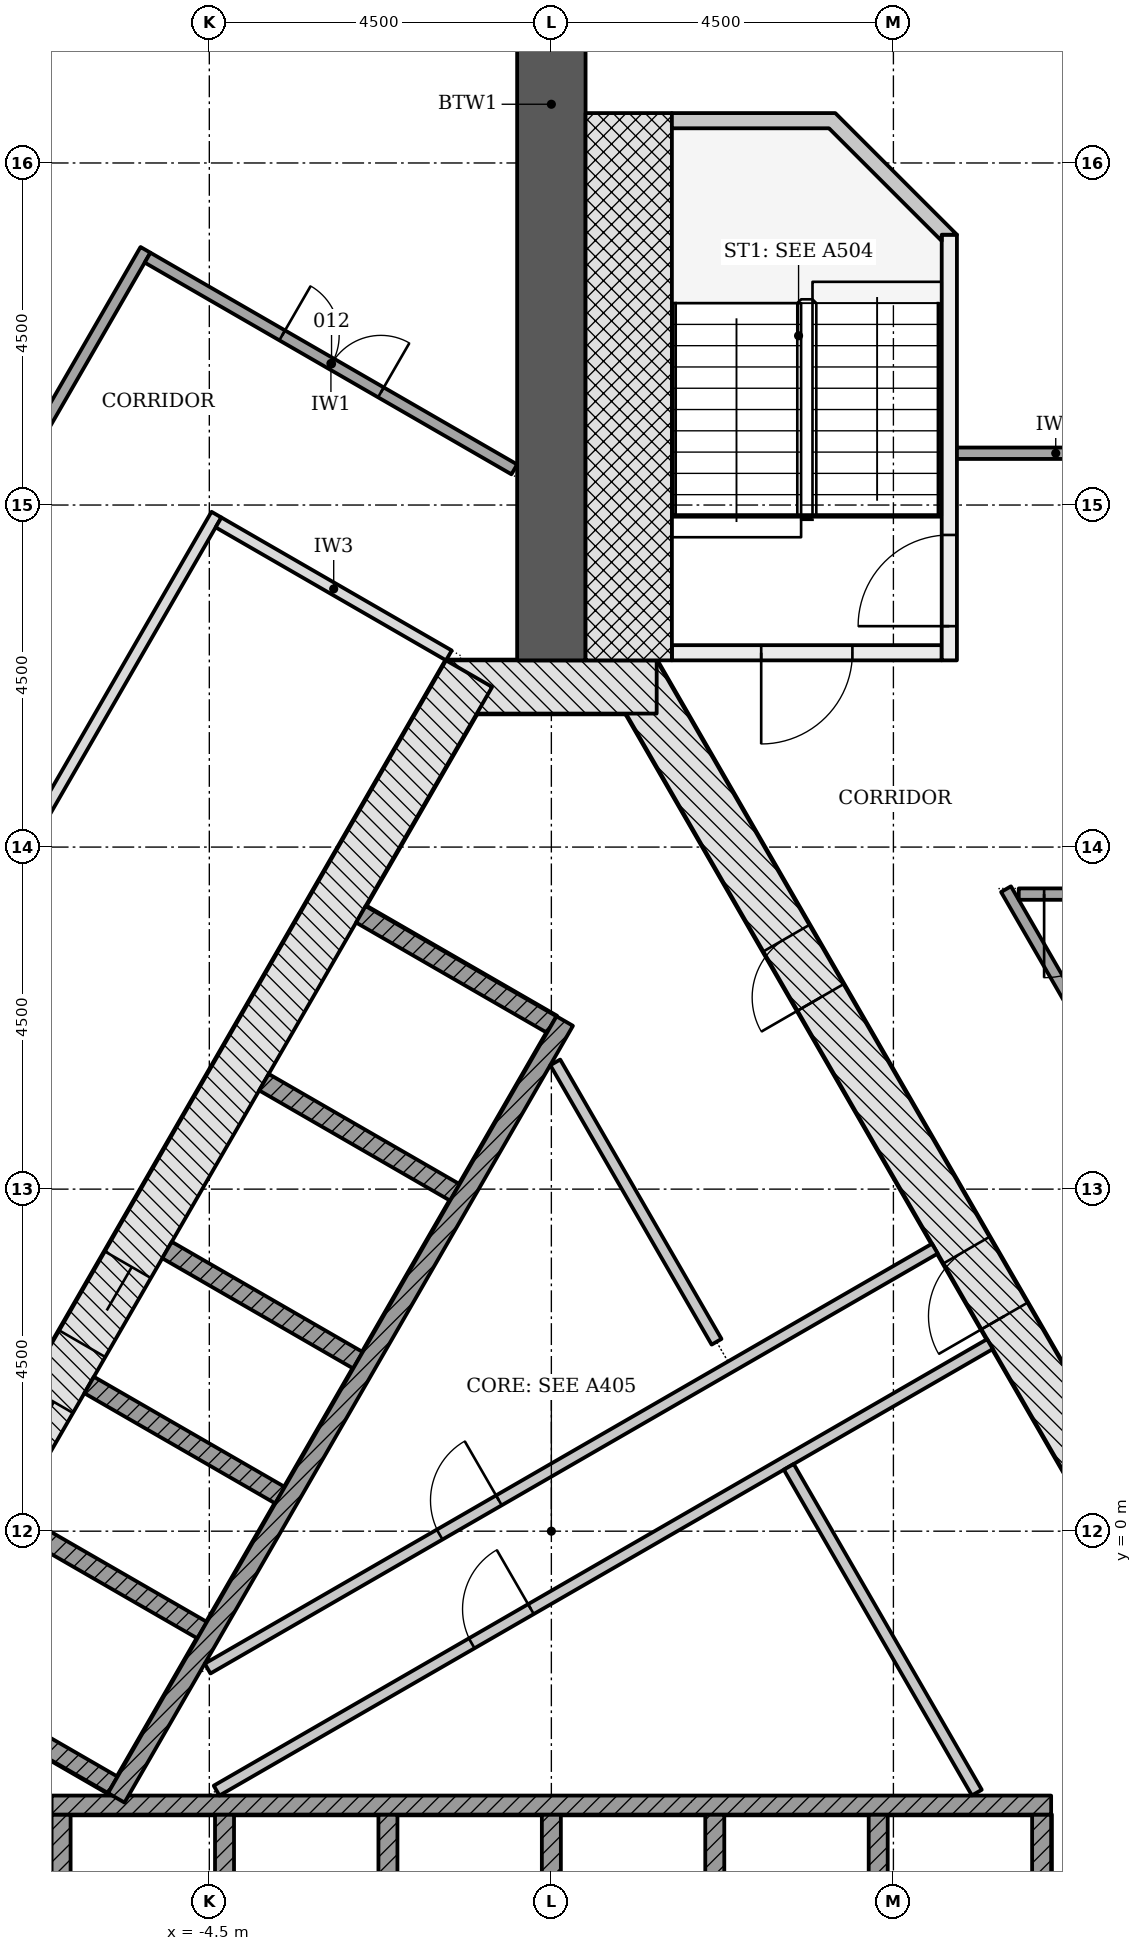
"""IFC4 building model, lengths in metres.
Left out: names, types, materials, properties, quantities, classifications, styles, units other than length and angle.
Written with IfcOpenShell. Run it as: python <this file> out.ifc"""

import sys

from ifc_helpers import new_model, si_unit, direction, frame, frame_2d, origin, place, context, subcontext, project, spatial, polyline, rectangle, outline, extrude, element, fill, save


model = new_model("IFC4")
c1 = context("Model", 3, precision=1e-05, world=origin(), true_north=direction((0.0, 1.0)))
c2 = subcontext(c1, "Body", "Model", "MODEL_VIEW")
j1 = project(units=[si_unit("LENGTHUNIT", "METRE"), si_unit("PLANEANGLEUNIT", "RADIAN")], contexts=[c1])
p1 = place(None, origin())
s1 = spatial("IfcSite", under=j1, at=p1, CompositionType="ELEMENT")
p2 = place(p1, origin())
s2 = spatial("IfcBuilding", under=s1, at=p2, CompositionType="ELEMENT")
p3 = place(p2, frame((0.0, 0.0, 24.0)))
s3 = spatial("IfcBuildingStorey", under=s2, at=p3, CompositionType="ELEMENT", Elevation=24.0)
p4 = place(p3, frame((10.311, -4.703, -0.2), z_axis=(0.0, 0.0, 1.0), x_axis=(-0.500001446645, 0.866024568562, 0.0)))
e1 = element("IfcWall", 1, at=p4, inside=s3, PredefinedType="SHEAR", context=c2, shape_type="SweptSolid", body=[
    extrude(rectangle(XDim=18.458, YDim=0.7, at=frame_2d((9.229, 0.0))), origin(), (0.0, 0.0, 1.0), 3.6),
])
p5 = place(p4, frame((8.7, 0.0, 0.2)))
e2 = element("IfcOpeningElement", 2, at=p5, cuts=e1, PredefinedType="OPENING", context=c2, shape_type="SweptSolid", body=[
    extrude(rectangle(XDim=1.0, YDim=2.1, at=frame_2d((0.5, 1.05))), frame((0.0, 0.36, 0.0), z_axis=(0.0, -1.0, 0.0), x_axis=(1.0, 0.0, 0.0)), (0.0, 0.0, 1.0), 0.72),
])
p6 = place(p4, frame((3.99, 0.0, 0.2)))
e3 = element("IfcOpeningElement", 3, at=p6, cuts=e1, PredefinedType="OPENING", context=c2, shape_type="SweptSolid", body=[
    extrude(rectangle(XDim=0.9, YDim=2.1, at=frame_2d((0.45, 1.05))), frame((0.0, 0.36, 0.0), z_axis=(0.0, -1.0, 0.0), x_axis=(1.0, 0.0, 0.0)), (0.0, 0.0, 1.0), 0.72),
])
p7 = place(p4, frame((13.539, 0.0, 0.2)))
e4 = element("IfcOpeningElement", 4, at=p7, cuts=e1, PredefinedType="OPENING", context=c2, shape_type="SweptSolid", body=[
    extrude(rectangle(XDim=0.9, YDim=2.1, at=frame_2d((0.45, 1.05))), frame((0.0, 0.36, 0.0), z_axis=(0.0, -1.0, 0.0), x_axis=(1.0, 0.0, 0.0)), (0.0, 0.0, 1.0), 0.72),
])
p8 = place(p3, frame((1.386, 11.106, -0.2), z_axis=(0.0, 0.0, 1.0), x_axis=(-1.0, 0.0, 0.0)))
e5 = element("IfcWall", 5, at=p8, inside=s3, PredefinedType="SHEAR", context=c2, shape_type="SweptSolid", body=[
    extrude(rectangle(XDim=2.771, YDim=0.7, at=frame_2d((1.386, 0.0))), origin(), (0.0, 0.0, 1.0), 3.6),
])
p9 = place(p3, frame((-1.083, 11.281, -0.2), z_axis=(0.0, 0.0, 1.0), x_axis=(-0.500001446645, -0.866024568562, 0.0)))
e6 = element("IfcWall", 6, at=p9, inside=s3, PredefinedType="SHEAR", context=c2, shape_type="SweptSolid", body=[
    extrude(rectangle(XDim=18.458, YDim=0.7, at=frame_2d((9.229, 0.0))), origin(), (0.0, 0.0, 1.0), 3.6),
])
p10 = place(p9, frame((8.979, 0.0, 0.2)))
e7 = element("IfcOpeningElement", 7, at=p10, cuts=e6, PredefinedType="OPENING", context=c2, shape_type="SweptSolid", body=[
    extrude(rectangle(XDim=1.2, YDim=2.1, at=frame_2d((0.6, 1.05))), frame((0.0, 0.36, 0.0), z_axis=(0.0, -1.0, 0.0), x_axis=(1.0, 0.0, 0.0)), (0.0, 0.0, 1.0), 0.72),
])
p11 = place(p9, frame((11.029, 0.0, 0.2)))
e8 = element("IfcOpeningElement", 8, at=p11, cuts=e6, PredefinedType="OPENING", context=c2, shape_type="SweptSolid", body=[
    extrude(rectangle(XDim=1.2, YDim=2.1, at=frame_2d((0.6, 1.05))), frame((0.0, 0.36, 0.0), z_axis=(0.0, -1.0, 0.0), x_axis=(1.0, 0.0, 0.0)), (0.0, 0.0, 1.0), 0.72),
])
p12 = place(p3, frame((0.0, 11.456, -0.2), z_axis=(0.0, 0.0, 1.0), x_axis=(0.0, 1.0, 0.0)))
e9 = element("IfcWall", 9, at=p12, inside=s3, PredefinedType="SHEAR", context=c2, shape_type="SweptSolid", body=[
    extrude(rectangle(XDim=14.633, YDim=0.9, at=frame_2d((7.316, 0.0))), origin(), (0.0, 0.0, 1.0), 3.6),
])
for number, where, z_axis, x_axis in (
    (10, (-6.45, -6.228, -0.2), (0.0, 0.0, 1.0), (0.0, 1.0, 0.0)),
    (11, (-4.3, -6.228, -0.2), (0.0, 0.0, 1.0), (0.0, 1.0, 0.0)),
    (12, (-2.15, -6.228, -0.2), (0.0, 0.0, 1.0), (0.0, 1.0, 0.0)),
    (13, (0.0, -6.228, -0.2), (0.0, 0.0, 1.0), (0.0, 1.0, 0.0)),
    (14, (2.15, -6.228, -0.2), (0.0, 0.0, 1.0), (0.0, 1.0, 0.0)),
    (15, (4.3, -6.228, -0.2), (0.0, 0.0, 1.0), (0.0, 1.0, 0.0)),
    (16, (6.45, -6.228, -0.2), (0.0, 0.0, 1.0), (0.0, 1.0, 0.0)),
):
    element("IfcWall", number, at=place(p3, frame(where, z_axis=z_axis, x_axis=x_axis)), inside=s3, PredefinedType="PARTITIONING", context=c2, shape_type="SweptSolid", body=[
        extrude(rectangle(XDim=2.5, YDim=0.25, at=frame_2d((1.25, 0.0))), origin(), (0.0, 0.0, 1.0), 3.6),
    ])
p13 = place(p3, frame((-6.575, -3.603, 0.0), z_axis=(0.0, 0.0, 1.0), x_axis=(1.0, 0.0, 0.0)))
e17 = element("IfcWall", 17, at=p13, inside=s3, PredefinedType="PARTITIONING", context=c2, shape_type="SweptSolid", body=[
    extrude(rectangle(XDim=13.15, YDim=0.25, at=frame_2d((6.575, 0.0))), origin(), (0.0, 0.0, 1.0), 3.4),
])
p14 = place(p3, frame((-2.506, 8.115, -0.2), z_axis=(0.0, 0.0, 1.0), x_axis=(0.865996321171, -0.50005036918, 0.0)))
e18 = element("IfcWall", 18, at=p14, inside=s3, PredefinedType="PARTITIONING", context=c2, shape_type="SweptSolid", body=[
    extrude(rectangle(XDim=2.9, YDim=0.25, at=frame_2d((1.45, 0.0))), origin(), (0.0, 0.0, 1.0), 3.6),
])
for number, where, z_axis, x_axis in (
    (19, (-3.781, 5.907, -0.2), (0.0, 0.0, 1.0), (0.866, -0.5, 0.0)),
    (20, (-5.056, 3.699, -0.2), (0.0, 0.0, 1.0), (0.866, -0.5, 0.0)),
    (21, (-6.081, 1.923, -0.2), (0.0, 0.0, 1.0), (0.866, -0.5, 0.0)),
    (22, (-7.106, 0.148, -0.2), (0.0, 0.0, 1.0), (0.866, -0.5, 0.0)),
    (23, (-8.281, -1.887, -0.2), (0.0, 0.0, 1.0), (0.866, -0.5, 0.0)),
):
    element("IfcWall", number, at=place(p3, frame(where, z_axis=z_axis, x_axis=x_axis)), inside=s3, PredefinedType="PARTITIONING", context=c2, shape_type="SweptSolid", body=[
        extrude(rectangle(XDim=2.9, YDim=0.25, at=frame_2d((1.45, 0.0))), origin(), (0.0, 0.0, 1.0), 3.6),
    ])
p15 = place(p3, frame((0.176, 6.711, 0.0), z_axis=(0.0, 0.0, 1.0), x_axis=(-0.500004227369, -0.866022963098, 0.0)))
e24 = element("IfcWall", 24, at=p15, inside=s3, PredefinedType="PARTITIONING", context=c2, shape_type="SweptSolid", body=[
    extrude(rectangle(XDim=11.8, YDim=0.25, at=frame_2d((5.9, 0.0))), origin(), (0.0, 0.0, 1.0), 3.4),
])
p16 = place(p3, frame((-4.523, -1.807, 0.0), z_axis=(0.0, 0.0, 1.0), x_axis=(0.866030300338, 0.499991518824, 0.0)))
e25 = element("IfcWall", 25, at=p16, inside=s3, PredefinedType="PARTITIONING", context=c2, shape_type="SweptSolid", body=[
    extrude(rectangle(XDim=11.049, YDim=0.15, at=frame_2d((5.524, 0.0))), origin(), (0.0, 0.0, 1.0), 3.4),
])
p17 = place(p16, frame((3.525, 0.0, 0.0)))
e26 = element("IfcOpeningElement", 26, at=p17, cuts=e25, PredefinedType="OPENING", context=c2, shape_type="SweptSolid", body=[
    extrude(rectangle(XDim=0.9, YDim=2.1, at=frame_2d((0.45, 1.05))), frame((0.0, 0.085, 0.0), z_axis=(0.0, -1.0, 0.0), x_axis=(1.0, 0.0, 0.0)), (0.0, 0.0, 1.0), 0.17),
])
p18 = place(p3, frame((-4.404, -3.413, 0.0), z_axis=(0.0, 0.0, 1.0), x_axis=(0.866022252853, 0.500005457533, 0.0)))
e27 = element("IfcWall", 27, at=p18, inside=s3, PredefinedType="PARTITIONING", context=c2, shape_type="SweptSolid", body=[
    extrude(rectangle(XDim=11.749, YDim=0.15, at=frame_2d((5.875, 0.0))), origin(), (0.0, 0.0, 1.0), 3.4),
])
p19 = place(p18, frame((3.875, 0.0, 0.0)))
e28 = element("IfcOpeningElement", 28, at=p19, cuts=e27, PredefinedType="OPENING", context=c2, shape_type="SweptSolid", body=[
    extrude(rectangle(XDim=0.9, YDim=2.1, at=frame_2d((0.45, 1.05))), frame((0.0, 0.085, 0.0), z_axis=(0.0, -1.0, 0.0), x_axis=(1.0, 0.0, 0.0)), (0.0, 0.0, 1.0), 0.17),
])
p20 = place(p3, frame((2.174, 2.492, 0.0), z_axis=(0.0, 0.0, 1.0), x_axis=(-0.499999641798, 0.866025610592, 0.0)))
e29 = element("IfcWall", 29, at=p20, inside=s3, PredefinedType="PARTITIONING", context=c2, shape_type="SweptSolid", body=[
    extrude(rectangle(XDim=4.244, YDim=0.15, at=frame_2d((2.122, 0.0))), origin(), (0.0, 0.0, 1.0), 3.4),
])
p21 = place(p3, frame((5.598, -3.439, 0.0), z_axis=(0.0, 0.0, 1.0), x_axis=(-0.500007155043, 0.866021272779, 0.0)))
e30 = element("IfcWall", 30, at=p21, inside=s3, PredefinedType="PARTITIONING", context=c2, shape_type="SweptSolid", body=[
    extrude(rectangle(XDim=4.949, YDim=0.15, at=frame_2d((2.474, 0.0))), origin(), (0.0, 0.0, 1.0), 3.4),
])
p22 = place(p3, frame((5.135, 11.556, -0.2), z_axis=(0.0, 0.0, 1.0), x_axis=(-1.0, 0.0, 0.0)))
e31 = element("IfcWall", 31, at=p22, inside=s3, PredefinedType="SHEAR", context=c2, shape_type="SweptSolid", body=[
    extrude(rectangle(XDim=3.55, YDim=0.2, at=frame_2d((1.775, 0.0))), origin(), (0.0, 0.0, 1.0), 3.6),
])
p23 = place(p22, frame((1.175, 0.0, 0.2)))
e32 = element("IfcOpeningElement", 32, at=p23, cuts=e31, PredefinedType="OPENING", context=c2, shape_type="SweptSolid", body=[
    extrude(rectangle(XDim=1.2, YDim=2.1, at=frame_2d((0.6, 1.05))), frame((0.0, 0.11, 0.0), z_axis=(0.0, -1.0, 0.0), x_axis=(1.0, 0.0, 0.0)), (0.0, 0.0, 1.0), 0.22),
])
p24 = place(p3, frame((5.236, 11.456, -0.2), z_axis=(0.0, 0.0, 1.0), x_axis=(0.0, 1.0, 0.0)))
e33 = element("IfcWall", 33, at=p24, inside=s3, PredefinedType="SHEAR", context=c2, shape_type="SweptSolid", body=[
    extrude(rectangle(XDim=5.6, YDim=0.2, at=frame_2d((2.8, 0.0))), origin(), (0.0, 0.0, 1.0), 3.6),
])
p25 = place(p24, frame((0.45, 0.0, 0.2)))
e34 = element("IfcOpeningElement", 34, at=p25, cuts=e33, PredefinedType="OPENING", context=c2, shape_type="SweptSolid", body=[
    extrude(rectangle(XDim=1.2, YDim=2.1, at=frame_2d((0.6, 1.05))), frame((0.0, 0.11, 0.0), z_axis=(0.0, -1.0, 0.0), x_axis=(1.0, 0.0, 0.0)), (0.0, 0.0, 1.0), 0.22),
])
p26 = place(p3, frame((1.018, 11.456, -0.2), z_axis=(0.0, 0.0, 1.0), x_axis=(0.0, 1.0, 0.0)))
e35 = element("IfcWall", 35, at=p26, inside=s3, PredefinedType="SHEAR", context=c2, shape_type="SweptSolid", body=[
    extrude(rectangle(XDim=7.2, YDim=1.136, at=frame_2d((3.6, 0.0))), origin(), (0.0, 0.0, 1.0), 3.6),
])
p27 = place(p3, frame((0.0, 0.0, -0.2)))
e36 = element("IfcWall", 36, at=p27, inside=s3, PredefinedType="SHEAR", context=c2, shape_type="SweptSolid", body=[
    extrude(outline(polyline([(5.336, 17.056), (3.736, 18.656), (1.586, 18.656), (1.586, 18.456), (3.653, 18.456), (5.135, 16.974), (5.135, 17.056), (5.135, 17.056), (5.135, 17.056), (5.135, 17.056), (5.135, 17.056), (5.135, 17.056), (5.135, 17.056), (5.135, 17.056), (5.135, 17.056), (5.135, 17.056), (5.135, 17.056), (5.135, 17.056), (5.135, 17.056), (5.135, 17.056), (5.135, 17.056), (5.135, 17.056), (5.135, 17.056), (5.336, 17.056)])), origin(), (0.0, 0.0, 1.0), 3.6),
])
p28 = place(p3, frame((-17.208, -3.699, 0.0), z_axis=(0.0, 0.0, 1.0), x_axis=(0.499997567621, 0.866026808115, 0.0)))
e37 = element("IfcWall", 37, at=p28, inside=s3, PredefinedType="PARTITIONING", context=c2, shape_type="SweptSolid", body=[
    extrude(rectangle(XDim=23.736, YDim=0.15, at=frame_2d((11.868, 0.0))), origin(), (0.0, 0.0, 1.0), 2.768),
])
p29 = place(p28, frame((16.656, 0.0, 0.0)))
e38 = element("IfcOpeningElement", 38, at=p29, cuts=e37, PredefinedType="OPENING", context=c2, shape_type="SweptSolid", body=[
    extrude(rectangle(XDim=1.1, YDim=2.1, at=frame_2d((0.55, 1.05))), frame((0.0, 0.085, 0.0), z_axis=(0.0, -1.0, 0.0), x_axis=(1.0, 0.0, 0.0)), (0.0, 0.0, 1.0), 0.17),
])
p30 = place(p28, frame((14.662, 0.0, 0.0)))
e39 = element("IfcOpeningElement", 39, at=p30, cuts=e37, PredefinedType="OPENING", context=c2, shape_type="SweptSolid", body=[
    extrude(rectangle(XDim=1.1, YDim=2.1, at=frame_2d((0.55, 1.05))), frame((0.0, 0.085, 0.0), z_axis=(0.0, -1.0, 0.0), x_axis=(1.0, 0.0, 0.0)), (0.0, 0.0, 1.0), 0.17),
])
p31 = place(p28, frame((5.273, 0.0, 0.0)))
e40 = element("IfcOpeningElement", 40, at=p31, cuts=e37, PredefinedType="OPENING", context=c2, shape_type="SweptSolid", body=[
    extrude(rectangle(XDim=1.0, YDim=2.1, at=frame_2d((0.5, 1.05))), frame((0.0, 0.085, 0.0), z_axis=(0.0, -1.0, 0.0), x_axis=(1.0, 0.0, 0.0)), (0.0, 0.0, 1.0), 0.17),
])
p32 = place(p3, frame((-4.407, 13.374, 0.0), z_axis=(0.0, 0.0, 1.0), x_axis=(-0.499997181693, -0.866027030928, 0.0)))
e41 = element("IfcWall", 41, at=p32, inside=s3, PredefinedType="PARTITIONING", context=c2, shape_type="SweptSolid", body=[
    extrude(rectangle(XDim=16.77, YDim=0.15, at=frame_2d((8.385, 0.0))), origin(), (0.0, 0.0, 1.0), 2.768),
])
p33 = place(p32, frame((8.879, 0.0, 0.0)))
e42 = element("IfcOpeningElement", 42, at=p33, cuts=e41, PredefinedType="OPENING", context=c2, shape_type="SweptSolid", body=[
    extrude(rectangle(XDim=1.0, YDim=2.1, at=frame_2d((0.5, 1.05))), frame((0.0, 0.085, 0.0), z_axis=(0.0, -1.0, 0.0), x_axis=(1.0, 0.0, 0.0)), (0.0, 0.0, 1.0), 0.17),
])
p34 = place(p3, frame((5.981, 8.446, 0.0), z_axis=(0.0, 0.0, 1.0), x_axis=(0.499996620721, -0.866027354803, 0.0)))
e43 = element("IfcWall", 43, at=p34, inside=s3, PredefinedType="PARTITIONING", context=c2, shape_type="SweptSolid", body=[
    extrude(rectangle(XDim=15.057, YDim=0.15, at=frame_2d((7.528, 0.0))), origin(), (0.0, 0.0, 1.0), 2.768),
])
p35 = place(p34, frame((9.087, 0.0, 0.0)))
e44 = element("IfcOpeningElement", 44, at=p35, cuts=e43, PredefinedType="OPENING", context=c2, shape_type="SweptSolid", body=[
    extrude(rectangle(XDim=1.1, YDim=2.1, at=frame_2d((0.55, 1.05))), frame((0.0, 0.085, 0.0), z_axis=(0.0, -1.0, 0.0), x_axis=(1.0, 0.0, 0.0)), (0.0, 0.0, 1.0), 0.17),
])
p36 = place(p34, frame((7.128, 0.0, 0.0)))
e45 = element("IfcOpeningElement", 45, at=p36, cuts=e43, PredefinedType="OPENING", context=c2, shape_type="SweptSolid", body=[
    extrude(rectangle(XDim=1.1, YDim=2.1, at=frame_2d((0.55, 1.05))), frame((0.0, 0.085, 0.0), z_axis=(0.0, -1.0, 0.0), x_axis=(1.0, 0.0, 0.0)), (0.0, 0.0, 1.0), 0.17),
])
p37 = place(p3, frame((-5.312, 16.755, 0.0), z_axis=(0.0, 0.0, 1.0), x_axis=(0.866028693448, -0.499994302092, 0.0)))
e46 = element("IfcWall", 46, at=p37, inside=s3, PredefinedType="PARTITIONING", context=c2, shape_type="SweptSolid", body=[
    extrude(rectangle(XDim=5.571, YDim=0.15, at=frame_2d((2.786, 0.0))), origin(), (0.0, 0.0, 1.0), 3.4),
])
p38 = place(p37, frame((2.045, 0.0, 0.0)))
e47 = element("IfcOpeningElement", 47, at=p38, cuts=e46, PredefinedType="OPENING", context=c2, shape_type="SweptSolid", body=[
    extrude(rectangle(XDim=1.5, YDim=2.1, at=frame_2d((0.75, 1.05))), frame((0.0, 0.085, 0.0), z_axis=(0.0, -1.0, 0.0), x_axis=(1.0, 0.0, 0.0)), (0.0, 0.0, 1.0), 0.17),
])
p39 = place(p3, frame((-4.379, 13.271, 0.0), z_axis=(0.0, 0.0, 1.0), x_axis=(0.866019471182, -0.500010275428, 0.0)))
e48 = element("IfcWall", 48, at=p39, inside=s3, PredefinedType="PARTITIONING", context=c2, shape_type="SweptSolid", body=[
    extrude(rectangle(XDim=3.5, YDim=0.15, at=frame_2d((1.75, 0.0))), origin(), (0.0, 0.0, 1.0), 3.4),
])
p40 = place(p3, frame((5.336, 14.181, 0.0), z_axis=(0.0, 0.0, 1.0), x_axis=(1.0, 0.0, 0.0)))
e49 = element("IfcWall", 49, at=p40, inside=s3, PredefinedType="PARTITIONING", context=c2, shape_type="SweptSolid", body=[
    extrude(rectangle(XDim=2.6, YDim=0.15, at=frame_2d((1.3, 0.0))), origin(), (0.0, 0.0, 1.0), 2.923),
])
p41 = place(p3, frame((7.936, 8.381, 0.0), z_axis=(0.0, 0.0, 1.0), x_axis=(-1.0, 0.0, 0.0)))
e50 = element("IfcWall", 50, at=p41, inside=s3, PredefinedType="PARTITIONING", context=c2, shape_type="SweptSolid", body=[
    extrude(rectangle(XDim=1.787, YDim=0.15, at=frame_2d((0.894, 0.0))), origin(), (0.0, 0.0, 1.0), 2.768),
])
p42 = place(p41, frame((0.353, 0.0, 0.0)))
e51 = element("IfcOpeningElement", 51, at=p42, cuts=e50, PredefinedType="OPENING", context=c2, shape_type="SweptSolid", body=[
    extrude(rectangle(XDim=1.1, YDim=2.1, at=frame_2d((0.55, 1.05))), frame((0.0, 0.085, 0.0), z_axis=(0.0, -1.0, 0.0), x_axis=(1.0, 0.0, 0.0)), (0.0, 0.0, 1.0), 0.17),
])
p43 = place(p10, origin())
e52 = element("IfcDoor", 52, at=p43, inside=s3, OperationType="DOUBLE_DOOR_SLIDING", PredefinedType="DOOR", context=c2, shape_type="SweptSolid", body=[
    extrude(rectangle(XDim=1.2, YDim=2.1, at=frame_2d((0.6, 1.05))), frame((0.0, 0.025, 0.0), z_axis=(0.0, -1.0, 0.0), x_axis=(1.0, 0.0, 0.0)), (0.0, 0.0, 1.0), 0.05),
])
fill(e7, e52)
p44 = place(p5, origin())
e53 = element("IfcDoor", 53, at=p44, inside=s3, OperationType="SINGLE_SWING_LEFT", PredefinedType="DOOR", context=c2, shape_type="SweptSolid", body=[
    extrude(rectangle(XDim=1.0, YDim=2.1, at=frame_2d((0.5, 1.05))), frame((0.0, 0.075, 0.0), z_axis=(0.0, -1.0, 0.0), x_axis=(1.0, 0.0, 0.0)), (0.0, 0.0, 1.0), 0.15),
])
fill(e2, e53)
p45 = place(p7, origin())
e54 = element("IfcDoor", 54, at=p45, inside=s3, OperationType="SINGLE_SWING_LEFT", PredefinedType="DOOR", context=c2, shape_type="SweptSolid", body=[
    extrude(rectangle(XDim=0.9, YDim=2.1, at=frame_2d((0.45, 1.05))), frame((0.0, 0.075, 0.0), z_axis=(0.0, -1.0, 0.0), x_axis=(1.0, 0.0, 0.0)), (0.0, 0.0, 1.0), 0.15),
])
fill(e4, e54)
p46 = place(p19, origin())
e55 = element("IfcDoor", 55, at=p46, inside=s3, OperationType="SINGLE_SWING_RIGHT", PredefinedType="DOOR", context=c2, shape_type="SweptSolid", body=[
    extrude(rectangle(XDim=0.9, YDim=2.1, at=frame_2d((0.45, 1.05))), frame((0.0, 0.025, 0.0), z_axis=(0.0, -1.0, 0.0), x_axis=(1.0, 0.0, 0.0)), (0.0, 0.0, 1.0), 0.05),
])
fill(e28, e55)
p47 = place(p17, origin())
e56 = element("IfcDoor", 56, at=p47, inside=s3, OperationType="SINGLE_SWING_RIGHT", PredefinedType="DOOR", context=c2, shape_type="SweptSolid", body=[
    extrude(rectangle(XDim=0.9, YDim=2.1, at=frame_2d((0.45, 1.05))), frame((0.0, 0.025, 0.0), z_axis=(0.0, -1.0, 0.0), x_axis=(1.0, 0.0, 0.0)), (0.0, 0.0, 1.0), 0.05),
])
fill(e26, e56)
p48 = place(p23, origin())
e57 = element("IfcDoor", 57, at=p48, inside=s3, OperationType="SINGLE_SWING_RIGHT", PredefinedType="DOOR", context=c2, shape_type="SweptSolid", body=[
    extrude(rectangle(XDim=1.2, YDim=2.1, at=frame_2d((0.6, 1.05))), frame((0.0, 0.025, 0.0), z_axis=(0.0, -1.0, 0.0), x_axis=(1.0, 0.0, 0.0)), (0.0, 0.0, 1.0), 0.05),
])
fill(e32, e57)
p49 = place(p25, origin())
e58 = element("IfcDoor", 58, at=p49, inside=s3, OperationType="SINGLE_SWING_LEFT", PredefinedType="DOOR", context=c2, shape_type="SweptSolid", body=[
    extrude(rectangle(XDim=1.2, YDim=2.1, at=frame_2d((0.6, 1.05))), frame((0.0, 0.025, 0.0), z_axis=(0.0, -1.0, 0.0), x_axis=(1.0, 0.0, 0.0)), (0.0, 0.0, 1.0), 0.05),
])
fill(e34, e58)
p50 = place(p38, origin())
e59 = element("IfcDoor", 59, at=p50, inside=s3, OperationType="DOUBLE_DOOR_SINGLE_SWING", PredefinedType="DOOR", context=c2, shape_type="SweptSolid", body=[
    extrude(rectangle(XDim=1.5, YDim=2.1, at=frame_2d((0.75, 1.05))), frame((0.0, 0.025, 0.0), z_axis=(0.0, -1.0, 0.0), x_axis=(1.0, 0.0, 0.0)), (0.0, 0.0, 1.0), 0.05),
])
fill(e47, e59)
p51 = place(p42, origin())
e60 = element("IfcDoor", 60, at=p51, inside=s3, OperationType="SINGLE_SWING_RIGHT", PredefinedType="DOOR", context=c2, shape_type="SweptSolid", body=[
    extrude(rectangle(XDim=1.1, YDim=2.1, at=frame_2d((0.55, 1.05))), frame((0.0, 0.025, 0.0), z_axis=(0.0, -1.0, 0.0), x_axis=(1.0, 0.0, 0.0)), (0.0, 0.0, 1.0), 0.05),
])
fill(e51, e60)
save(model, sys.argv[1])
